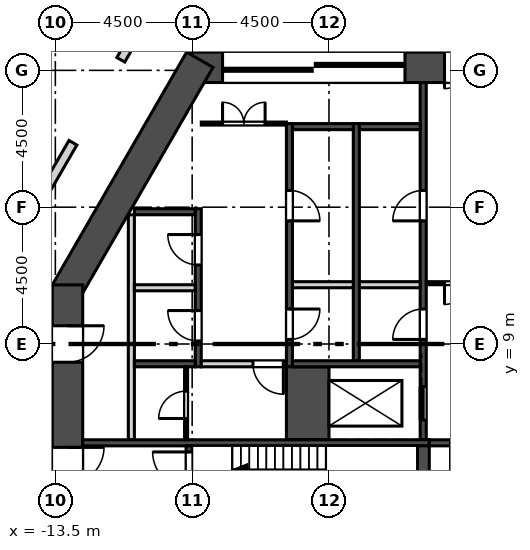
"""IFC4 building model, lengths in metres.
Left out: names, types, materials, properties, quantities, classifications, styles, units other than length and angle.
Written with IfcOpenShell. Run it as: python <this file> out.ifc"""

import sys

from ifc_helpers import new_model, si_unit, direction, frame, frame_2d, origin, place, context, subcontext, project, spatial, rectangle, extrude, element, fill, save


model = new_model("IFC4")
c1 = context("Model", 3, precision=1e-05, world=origin(), true_north=direction((0.0, 1.0)))
c2 = subcontext(c1, "Body", "Model", "MODEL_VIEW")
j1 = project(units=[si_unit("LENGTHUNIT", "METRE"), si_unit("PLANEANGLEUNIT", "RADIAN")], contexts=[c1])
p1 = place(None, origin())
s1 = spatial("IfcSite", under=j1, at=p1, CompositionType="ELEMENT")
p2 = place(p1, origin())
s2 = spatial("IfcBuilding", under=s1, at=p2, CompositionType="ELEMENT")
p3 = place(p2, frame((0.0, 0.0, 259.5)))
s3 = spatial("IfcBuildingStorey", under=s2, at=p3, CompositionType="ELEMENT", Elevation=259.5)
p4 = place(p3, frame((9.181, 18.1, 0.0), z_axis=(0.0, 0.0, 1.0), x_axis=(-1.0, 0.0, 0.0)))
e1 = element("IfcWall", 1, at=p4, inside=s3, PredefinedType="SHEAR", context=c2, shape_type="SweptSolid", body=[
    extrude(rectangle(XDim=18.361, YDim=1.0, at=frame_2d((9.181, 0.0))), origin(), (0.0, 0.0, 1.0), 7.2),
])
p5 = place(p4, frame((8.481, 0.0, 0.0)))
e2 = element("IfcOpeningElement", 2, at=p5, cuts=e1, PredefinedType="OPENING", context=c2, shape_type="SweptSolid", body=[
    extrude(rectangle(XDim=1.4, YDim=2.1, at=frame_2d((0.7, 1.05))), frame((0.0, 0.51, 0.0), z_axis=(0.0, -1.0, 0.0), x_axis=(1.0, 0.0, 0.0)), (0.0, 0.0, 1.0), 1.02),
])
p6 = place(p4, frame((11.181, 0.0, 0.0)))
e3 = element("IfcOpeningElement", 3, at=p6, cuts=e1, PredefinedType="OPENING", context=c2, shape_type="SweptSolid", body=[
    extrude(rectangle(XDim=6.0, YDim=2.4, at=frame_2d((3.0, 1.2))), frame((0.0, 0.51, 0.0), z_axis=(0.0, -1.0, 0.0), x_axis=(1.0, 0.0, 0.0)), (0.0, 0.0, 1.0), 1.02),
])
p7 = place(p4, frame((1.181, 0.0, 0.0)))
e4 = element("IfcOpeningElement", 4, at=p7, cuts=e1, PredefinedType="OPENING", context=c2, shape_type="SweptSolid", body=[
    extrude(rectangle(XDim=6.0, YDim=2.4, at=frame_2d((3.0, 1.2))), frame((0.0, 0.51, 0.0), z_axis=(0.0, -1.0, 0.0), x_axis=(1.0, 0.0, 0.0)), (0.0, 0.0, 1.0), 1.02),
])
p8 = place(p3, frame((-8.748, 18.35, 0.0), z_axis=(0.0, 0.0, 1.0), x_axis=(-0.499995021168, -0.866028278295, 0.0)))
e5 = element("IfcWall", 5, at=p8, inside=s3, PredefinedType="SHEAR", context=c2, shape_type="SweptSolid", body=[
    extrude(rectangle(XDim=8.839, YDim=1.0, at=frame_2d((4.419, 0.0))), origin(), (0.0, 0.0, 1.0), 7.2),
])
p9 = place(p3, frame((-13.1, 10.945, 0.0), z_axis=(0.0, 0.0, 1.0), x_axis=(0.0, -1.0, 0.0)))
e6 = element("IfcWall", 6, at=p9, inside=s3, PredefinedType="SHEAR", context=c2, shape_type="SweptSolid", body=[
    extrude(rectangle(XDim=9.695, YDim=1.0, at=frame_2d((4.848, 0.0))), origin(), (0.0, 0.0, 1.0), 7.2),
])
p10 = place(p9, frame((5.345, 0.0, 0.0)))
e7 = element("IfcOpeningElement", 7, at=p10, cuts=e6, PredefinedType="OPENING", context=c2, shape_type="SweptSolid", body=[
    extrude(rectangle(XDim=1.2, YDim=2.1, at=frame_2d((0.6, 1.05))), frame((0.0, 0.51, 0.0), z_axis=(0.0, -1.0, 0.0), x_axis=(1.0, 0.0, 0.0)), (0.0, 0.0, 1.0), 1.02),
])
p11 = place(p9, frame((1.345, 0.0, 0.0)))
e8 = element("IfcOpeningElement", 8, at=p11, cuts=e6, PredefinedType="OPENING", context=c2, shape_type="SweptSolid", body=[
    extrude(rectangle(XDim=1.2, YDim=2.1, at=frame_2d((0.6, 1.05))), frame((0.0, 0.51, 0.0), z_axis=(0.0, -1.0, 0.0), x_axis=(1.0, 0.0, 0.0)), (0.0, 0.0, 1.0), 1.02),
])
p12 = place(p3, frame((-4.353, 45.242, 0.0), z_axis=(0.0, 0.0, 1.0), x_axis=(-0.500000891752, -0.866024888931, 0.0)))
e9 = element("IfcWall", 9, at=p12, inside=s3, PredefinedType="SOLIDWALL", context=c2, shape_type="SweptSolid", body=[
    extrude(rectangle(XDim=43.339, YDim=0.34, at=frame_2d((21.669, 0.0))), origin(), (0.0, 0.0, 1.0), 6.8),
])
p13 = place(p3, frame((-11.0, 5.85, 0.0), z_axis=(0.0, 0.0, 1.0), x_axis=(0.0, 1.0, 0.0)))
e10 = element("IfcWall", 10, at=p13, inside=s3, PredefinedType="SOLIDWALL", context=c2, shape_type="SweptSolid", body=[
    extrude(rectangle(XDim=7.4, YDim=0.2, at=frame_2d((3.7, 0.0))), origin(), (0.0, 0.0, 1.0), 6.8),
])
p14 = place(p3, frame((-8.8, 8.25, -0.4), z_axis=(0.0, 0.0, 1.0), x_axis=(0.0, 1.0, 0.0)))
e11 = element("IfcWall", 11, at=p14, inside=s3, PredefinedType="SOLIDWALL", context=c2, shape_type="SweptSolid", body=[
    extrude(rectangle(XDim=5.2, YDim=0.2, at=frame_2d((2.6, 0.0))), origin(), (0.0, 0.0, 1.0), 7.2),
])
p15 = place(p14, frame((0.85, 0.0, 0.4)))
e12 = element("IfcOpeningElement", 12, at=p15, cuts=e11, PredefinedType="OPENING", context=c2, shape_type="SweptSolid", body=[
    extrude(rectangle(XDim=1.0, YDim=2.1, at=frame_2d((0.5, 1.05))), frame((0.0, 0.11, 0.0), z_axis=(0.0, -1.0, 0.0), x_axis=(1.0, 0.0, 0.0)), (0.0, 0.0, 1.0), 0.22),
])
p16 = place(p14, frame((3.35, 0.0, 0.4)))
e13 = element("IfcOpeningElement", 13, at=p16, cuts=e11, PredefinedType="OPENING", context=c2, shape_type="SweptSolid", body=[
    extrude(rectangle(XDim=1.0, YDim=2.1, at=frame_2d((0.5, 1.05))), frame((0.0, 0.11, 0.0), z_axis=(0.0, -1.0, 0.0), x_axis=(1.0, 0.0, 0.0)), (0.0, 0.0, 1.0), 0.22),
])
p17 = place(p3, frame((-5.8, 8.25, -0.4), z_axis=(0.0, 0.0, 1.0), x_axis=(0.0, 1.0, 0.0)))
e14 = element("IfcWall", 14, at=p17, inside=s3, PredefinedType="SOLIDWALL", context=c2, shape_type="SweptSolid", body=[
    extrude(rectangle(XDim=8.0, YDim=0.2, at=frame_2d((4.0, 0.0))), origin(), (0.0, 0.0, 1.0), 7.2),
])
p18 = place(p17, frame((0.9, 0.0, 0.4)))
e15 = element("IfcOpeningElement", 15, at=p18, cuts=e14, PredefinedType="OPENING", context=c2, shape_type="SweptSolid", body=[
    extrude(rectangle(XDim=1.0, YDim=2.1, at=frame_2d((0.5, 1.05))), frame((0.0, 0.11, 0.0), z_axis=(0.0, -1.0, 0.0), x_axis=(1.0, 0.0, 0.0)), (0.0, 0.0, 1.0), 0.22),
])
p19 = place(p17, frame((4.8, 0.0, 0.4)))
e16 = element("IfcOpeningElement", 16, at=p19, cuts=e14, PredefinedType="OPENING", context=c2, shape_type="SweptSolid", body=[
    extrude(rectangle(XDim=1.0, YDim=2.1, at=frame_2d((0.5, 1.05))), frame((0.0, 0.11, 0.0), z_axis=(0.0, -1.0, 0.0), x_axis=(1.0, 0.0, 0.0)), (0.0, 0.0, 1.0), 0.22),
])
p20 = place(p3, frame((-3.6, 8.45, -0.4), z_axis=(0.0, 0.0, 1.0), x_axis=(0.0, 1.0, 0.0)))
e17 = element("IfcWall", 17, at=p20, inside=s3, PredefinedType="SOLIDWALL", context=c2, shape_type="SweptSolid", body=[
    extrude(rectangle(XDim=7.8, YDim=0.2, at=frame_2d((3.9, 0.0))), origin(), (0.0, 0.0, 1.0), 7.2),
])
p21 = place(p3, frame((-1.4, 5.85, -0.4), z_axis=(0.0, 0.0, 1.0), x_axis=(0.0, 1.0, 0.0)))
e18 = element("IfcWall", 18, at=p21, inside=s3, PredefinedType="SOLIDWALL", context=c2, shape_type="SweptSolid", body=[
    extrude(rectangle(XDim=11.75, YDim=0.2, at=frame_2d((5.875, 0.0))), origin(), (0.0, 0.0, 1.0), 7.2),
])
p22 = place(p21, frame((0.65, 0.0, 0.4)))
e19 = element("IfcOpeningElement", 19, at=p22, cuts=e18, PredefinedType="OPENING", context=c2, shape_type="SweptSolid", body=[
    extrude(rectangle(XDim=1.1, YDim=2.1, at=frame_2d((0.55, 1.05))), frame((0.0, 0.11, 0.0), z_axis=(0.0, -1.0, 0.0), x_axis=(1.0, 0.0, 0.0)), (0.0, 0.0, 1.0), 0.22),
])
p23 = place(p21, frame((3.3, 0.0, 0.4)))
e20 = element("IfcOpeningElement", 20, at=p23, cuts=e18, PredefinedType="OPENING", context=c2, shape_type="SweptSolid", body=[
    extrude(rectangle(XDim=1.0, YDim=2.1, at=frame_2d((0.5, 1.05))), frame((0.0, 0.11, 0.0), z_axis=(0.0, -1.0, 0.0), x_axis=(1.0, 0.0, 0.0)), (0.0, 0.0, 1.0), 0.22),
])
p24 = place(p21, frame((7.2, 0.0, 0.4)))
e21 = element("IfcOpeningElement", 21, at=p24, cuts=e18, PredefinedType="OPENING", context=c2, shape_type="SweptSolid", body=[
    extrude(rectangle(XDim=1.0, YDim=2.1, at=frame_2d((0.5, 1.05))), frame((0.0, 0.11, 0.0), z_axis=(0.0, -1.0, 0.0), x_axis=(1.0, 0.0, 0.0)), (0.0, 0.0, 1.0), 0.22),
])
p25 = place(p3, frame((-5.2, 5.85, -0.4), z_axis=(0.0, 0.0, 1.0), x_axis=(0.0, 1.0, 0.0)))
e22 = element("IfcWall", 22, at=p25, inside=s3, PredefinedType="SOLIDWALL", context=c2, shape_type="SweptSolid", body=[
    extrude(rectangle(XDim=2.4, YDim=1.4, at=frame_2d((1.2, 0.0))), origin(), (0.0, 0.0, 1.0), 7.2),
])
p26 = place(p3, frame((-10.9, 8.35, -0.4), z_axis=(0.0, 0.0, 1.0), x_axis=(1.0, 0.0, 0.0)))
e23 = element("IfcWall", 23, at=p26, inside=s3, PredefinedType="SOLIDWALL", context=c2, shape_type="SweptSolid", body=[
    extrude(rectangle(XDim=2.0, YDim=0.2, at=frame_2d((1.0, 0.0))), origin(), (0.0, 0.0, 1.0), 7.2),
])
p27 = place(p3, frame((-5.7, 8.35, -0.4), z_axis=(0.0, 0.0, 1.0), x_axis=(1.0, 0.0, 0.0)))
e24 = element("IfcWall", 24, at=p27, inside=s3, PredefinedType="SOLIDWALL", context=c2, shape_type="SweptSolid", body=[
    extrude(rectangle(XDim=4.2, YDim=0.2, at=frame_2d((2.1, 0.0))), origin(), (0.0, 0.0, 1.0), 7.2),
])
p28 = place(p3, frame((-12.6, 5.75, -0.4), z_axis=(0.0, 0.0, 1.0), x_axis=(1.0, 0.0, 0.0)))
e25 = element("IfcWall", 25, at=p28, inside=s3, PredefinedType="SOLIDWALL", context=c2, shape_type="SweptSolid", body=[
    extrude(rectangle(XDim=11.4, YDim=0.2, at=frame_2d((5.7, 0.0))), origin(), (0.0, 0.0, 1.0), 7.2),
])
p29 = place(p3, frame((-1.2, 5.75, -0.4), z_axis=(0.0, 0.0, 1.0), x_axis=(1.0, 0.0, 0.0)))
e26 = element("IfcWall", 26, at=p29, inside=s3, PredefinedType="SOLIDWALL", context=c2, shape_type="SweptSolid", body=[
    extrude(rectangle(XDim=2.4, YDim=0.2, at=frame_2d((1.2, 0.0))), origin(), (0.0, 0.0, 1.0), 7.2),
])
p30 = place(p29, frame((0.7, 0.0, 0.4)))
e27 = element("IfcOpeningElement", 27, at=p30, cuts=e26, PredefinedType="OPENING", context=c2, shape_type="SweptSolid", body=[
    extrude(rectangle(XDim=1.0, YDim=2.1, at=frame_2d((0.5, 1.05))), frame((0.0, 0.11, 0.0), z_axis=(0.0, -1.0, 0.0), x_axis=(1.0, 0.0, 0.0)), (0.0, 0.0, 1.0), 0.22),
])
p31 = place(p3, frame((-9.1, 2.25, -0.4), z_axis=(0.0, 0.0, 1.0), x_axis=(0.0, 1.0, 0.0)))
e28 = element("IfcWall", 28, at=p31, inside=s3, PredefinedType="SOLIDWALL", context=c2, shape_type="SweptSolid", body=[
    extrude(rectangle(XDim=3.4, YDim=0.2, at=frame_2d((1.7, 0.0))), origin(), (0.0, 0.0, 1.0), 7.2),
])
p32 = place(p31, frame((0.2, 0.0, 0.4)))
e29 = element("IfcOpeningElement", 29, at=p32, cuts=e28, PredefinedType="OPENING", context=c2, shape_type="SweptSolid", body=[
    extrude(rectangle(XDim=1.2, YDim=2.1, at=frame_2d((0.6, 1.05))), frame((0.0, 0.11, 0.0), z_axis=(0.0, -1.0, 0.0), x_axis=(1.0, 0.0, 0.0)), (0.0, 0.0, 1.0), 0.22),
])
p33 = place(p31, frame((2.0, 0.0, 0.4)))
e30 = element("IfcOpeningElement", 30, at=p33, cuts=e28, PredefinedType="OPENING", context=c2, shape_type="SweptSolid", body=[
    extrude(rectangle(XDim=1.2, YDim=2.1, at=frame_2d((0.6, 1.05))), frame((0.0, 0.11, 0.0), z_axis=(0.0, -1.0, 0.0), x_axis=(1.0, 0.0, 0.0)), (0.0, 0.0, 1.0), 0.22),
])
p34 = place(p3, frame((-1.4, 2.25, -0.4), z_axis=(0.0, 0.0, 1.0), x_axis=(0.0, 1.0, 0.0)))
e31 = element("IfcWall", 31, at=p34, inside=s3, PredefinedType="SOLIDWALL", context=c2, shape_type="SweptSolid", body=[
    extrude(rectangle(XDim=3.4, YDim=0.4, at=frame_2d((1.7, 0.0))), origin(), (0.0, 0.0, 1.0), 7.2),
])
p35 = place(p3, frame((-10.9, 10.85, 0.0), z_axis=(0.0, 0.0, 1.0), x_axis=(1.0, 0.0, 0.0)))
e32 = element("IfcWall", 32, at=p35, inside=s3, PredefinedType="SOLIDWALL", context=c2, shape_type="SweptSolid", body=[
    extrude(rectangle(XDim=2.0, YDim=0.2, at=frame_2d((1.0, 0.0))), origin(), (0.0, 0.0, 1.0), 6.8),
])
p36 = place(p3, frame((-10.9, 13.35, -0.4), z_axis=(0.0, 0.0, 1.0), x_axis=(1.0, 0.0, 0.0)))
e33 = element("IfcWall", 33, at=p36, inside=s3, PredefinedType="SOLIDWALL", context=c2, shape_type="SweptSolid", body=[
    extrude(rectangle(XDim=2.0, YDim=0.2, at=frame_2d((1.0, 0.0))), origin(), (0.0, 0.0, 1.0), 7.2),
])
p37 = place(p3, frame((-5.7, 10.95, 0.0), z_axis=(0.0, 0.0, 1.0), x_axis=(1.0, 0.0, 0.0)))
e34 = element("IfcWall", 34, at=p37, inside=s3, PredefinedType="SOLIDWALL", context=c2, shape_type="SweptSolid", body=[
    extrude(rectangle(XDim=2.0, YDim=0.2, at=frame_2d((1.0, 0.0))), origin(), (0.0, 0.0, 1.0), 6.8),
])
p38 = place(p3, frame((-5.7, 16.15, -0.4), z_axis=(0.0, 0.0, 1.0), x_axis=(1.0, 0.0, 0.0)))
e35 = element("IfcWall", 35, at=p38, inside=s3, PredefinedType="SOLIDWALL", context=c2, shape_type="SweptSolid", body=[
    extrude(rectangle(XDim=2.0, YDim=0.2, at=frame_2d((1.0, 0.0))), origin(), (0.0, 0.0, 1.0), 7.2),
])
p39 = place(p3, frame((-3.5, 10.95, 0.0), z_axis=(0.0, 0.0, 1.0), x_axis=(1.0, 0.0, 0.0)))
e36 = element("IfcWall", 36, at=p39, inside=s3, PredefinedType="SOLIDWALL", context=c2, shape_type="SweptSolid", body=[
    extrude(rectangle(XDim=2.0, YDim=0.2, at=frame_2d((1.0, 0.0))), origin(), (0.0, 0.0, 1.0), 6.8),
])
p40 = place(p3, frame((-3.5, 16.15, -0.4), z_axis=(0.0, 0.0, 1.0), x_axis=(1.0, 0.0, 0.0)))
e37 = element("IfcWall", 37, at=p40, inside=s3, PredefinedType="SOLIDWALL", context=c2, shape_type="SweptSolid", body=[
    extrude(rectangle(XDim=2.0, YDim=0.2, at=frame_2d((1.0, 0.0))), origin(), (0.0, 0.0, 1.0), 7.2),
])
p41 = place(p3, frame((-8.7, 16.25, 0.0), z_axis=(0.0, 0.0, 1.0), x_axis=(1.0, 0.0, 0.0)))
e38 = element("IfcWall", 38, at=p41, inside=s3, PredefinedType="PARTITIONING", context=c2, shape_type="SweptSolid", body=[
    extrude(rectangle(XDim=2.8, YDim=0.1, at=frame_2d((1.4, 0.0))), origin(), (0.0, 0.0, 1.0), 6.8),
])
p42 = place(p41, frame((0.7, 0.0, 0.0)))
e39 = element("IfcOpeningElement", 39, at=p42, cuts=e38, PredefinedType="OPENING", context=c2, shape_type="SweptSolid", body=[
    extrude(rectangle(XDim=1.4, YDim=2.1, at=frame_2d((0.7, 1.05))), frame((0.0, 0.06, 0.0), z_axis=(0.0, -1.0, 0.0), x_axis=(1.0, 0.0, 0.0)), (0.0, 0.0, 1.0), 0.12),
])
p43 = place(p3, frame((-9.2, 5.85, 0.0), z_axis=(0.0, 0.0, 1.0), x_axis=(0.0, 1.0, 0.0)))
e40 = element("IfcWall", 40, at=p43, inside=s3, PredefinedType="PARTITIONING", context=c2, shape_type="SweptSolid", body=[
    extrude(rectangle(XDim=2.4, YDim=0.1, at=frame_2d((1.2, 0.0))), origin(), (0.0, 0.0, 1.0), 6.8),
])
p44 = place(p43, frame((0.7, 0.0, 0.0)))
e41 = element("IfcOpeningElement", 41, at=p44, cuts=e40, PredefinedType="OPENING", context=c2, shape_type="SweptSolid", body=[
    extrude(rectangle(XDim=0.9, YDim=2.1, at=frame_2d((0.45, 1.05))), frame((0.0, 0.06, 0.0), z_axis=(0.0, -1.0, 0.0), x_axis=(1.0, 0.0, 0.0)), (0.0, 0.0, 1.0), 0.12),
])
p45 = place(p3, frame((-8.7, 8.35, 0.0), z_axis=(0.0, 0.0, 1.0), x_axis=(1.0, 0.0, 0.0)))
e42 = element("IfcWall", 42, at=p45, inside=s3, PredefinedType="SOLIDWALL", context=c2, shape_type="SweptSolid", body=[
    extrude(rectangle(XDim=2.8, YDim=0.2, at=frame_2d((1.4, 0.0))), origin(), (0.0, 0.0, 1.0), 6.8),
])
p46 = place(p45, frame((1.7, 0.0, 0.0)))
e43 = element("IfcOpeningElement", 43, at=p46, cuts=e42, PredefinedType="OPENING", context=c2, shape_type="SweptSolid", body=[
    extrude(rectangle(XDim=1.0, YDim=2.1, at=frame_2d((0.5, 1.05))), frame((0.0, 0.11, 0.0), z_axis=(0.0, -1.0, 0.0), x_axis=(1.0, 0.0, 0.0)), (0.0, 0.0, 1.0), 0.22),
])
p47 = place(p3, frame((-1.3, 11.0, 0.0), z_axis=(0.0, 0.0, 1.0), x_axis=(1.0, 0.0, 0.0)))
e44 = element("IfcWall", 44, at=p47, inside=s3, PredefinedType="PARTITIONING", context=c2, shape_type="SweptSolid", body=[
    extrude(rectangle(XDim=2.6, YDim=0.1, at=frame_2d((1.3, 0.0))), origin(), (0.0, 0.0, 1.0), 6.8),
])
p48 = place(p47, frame((0.6, 0.0, 0.0)))
e45 = element("IfcOpeningElement", 45, at=p48, cuts=e44, PredefinedType="OPENING", context=c2, shape_type="SweptSolid", body=[
    extrude(rectangle(XDim=1.4, YDim=2.1, at=frame_2d((0.7, 1.05))), frame((0.0, 0.06, 0.0), z_axis=(0.0, -1.0, 0.0), x_axis=(1.0, 0.0, 0.0)), (0.0, 0.0, 1.0), 0.12),
])
p49 = place(p3, frame((-15.226, 11.629, 0.0), z_axis=(0.0, 0.0, 1.0), x_axis=(0.49997925212, 0.866037382247, 0.0)))
e46 = element("IfcWall", 46, at=p49, inside=s3, PredefinedType="SOLIDWALL", context=c2, shape_type="SweptSolid", body=[
    extrude(rectangle(XDim=4.609, YDim=0.3, at=frame_2d((2.304, 0.0))), origin(), (0.0, 0.0, 1.0), 6.8),
])
p50 = place(p3, frame((-11.347, 18.348, 0.0), z_axis=(0.0, 0.0, 1.0), x_axis=(0.500026652407, 0.866010015463, 0.0)))
e47 = element("IfcWall", 47, at=p50, inside=s3, PredefinedType="SOLIDWALL", context=c2, shape_type="SweptSolid", body=[
    extrude(rectangle(XDim=2.107, YDim=0.3, at=frame_2d((1.054, 0.0))), origin(), (0.0, 0.0, 1.0), 6.8),
])
p51 = place(p22, origin())
e48 = element("IfcDoor", 48, at=p51, inside=s3, OperationType="SLIDING_TO_RIGHT", PredefinedType="DOOR", context=c2, shape_type="SweptSolid", body=[
    extrude(rectangle(XDim=1.1, YDim=2.1, at=frame_2d((0.55, 1.05))), frame((0.0, 0.025, 0.0), z_axis=(0.0, -1.0, 0.0), x_axis=(1.0, 0.0, 0.0)), (0.0, 0.0, 1.0), 0.05),
])
fill(e19, e48)
p52 = place(p15, origin())
e49 = element("IfcDoor", 49, at=p52, inside=s3, OperationType="SINGLE_SWING_RIGHT", PredefinedType="DOOR", context=c2, shape_type="SweptSolid", body=[
    extrude(rectangle(XDim=1.0, YDim=2.1, at=frame_2d((0.5, 1.05))), frame((0.0, 0.025, 0.0), z_axis=(0.0, -1.0, 0.0), x_axis=(1.0, 0.0, 0.0)), (0.0, 0.0, 1.0), 0.05),
])
fill(e12, e49)
p53 = place(p16, origin())
e50 = element("IfcDoor", 50, at=p53, inside=s3, OperationType="SINGLE_SWING_RIGHT", PredefinedType="DOOR", context=c2, shape_type="SweptSolid", body=[
    extrude(rectangle(XDim=1.0, YDim=2.1, at=frame_2d((0.5, 1.05))), frame((0.0, 0.025, 0.0), z_axis=(0.0, -1.0, 0.0), x_axis=(1.0, 0.0, 0.0)), (0.0, 0.0, 1.0), 0.05),
])
fill(e13, e50)
p54 = place(p18, frame((1.0, 0.0, 0.0), z_axis=(0.0, 0.0, 1.0), x_axis=(-1.0, 0.0, 0.0)))
e51 = element("IfcDoor", 51, at=p54, inside=s3, OperationType="SINGLE_SWING_LEFT", PredefinedType="DOOR", context=c2, shape_type="SweptSolid", body=[
    extrude(rectangle(XDim=1.0, YDim=2.1, at=frame_2d((0.5, 1.05))), frame((0.0, 0.025, 0.0), z_axis=(0.0, -1.0, 0.0), x_axis=(1.0, 0.0, 0.0)), (0.0, 0.0, 1.0), 0.05),
])
fill(e15, e51)
p55 = place(p19, frame((1.0, 0.0, 0.0), z_axis=(0.0, 0.0, 1.0), x_axis=(-1.0, 0.0, 0.0)))
e52 = element("IfcDoor", 52, at=p55, inside=s3, OperationType="SINGLE_SWING_RIGHT", PredefinedType="DOOR", context=c2, shape_type="SweptSolid", body=[
    extrude(rectangle(XDim=1.0, YDim=2.1, at=frame_2d((0.5, 1.05))), frame((0.0, 0.025, 0.0), z_axis=(0.0, -1.0, 0.0), x_axis=(1.0, 0.0, 0.0)), (0.0, 0.0, 1.0), 0.05),
])
fill(e16, e52)
p56 = place(p23, origin())
e53 = element("IfcDoor", 53, at=p56, inside=s3, OperationType="SINGLE_SWING_LEFT", PredefinedType="DOOR", context=c2, shape_type="SweptSolid", body=[
    extrude(rectangle(XDim=1.0, YDim=2.1, at=frame_2d((0.5, 1.05))), frame((0.0, 0.025, 0.0), z_axis=(0.0, -1.0, 0.0), x_axis=(1.0, 0.0, 0.0)), (0.0, 0.0, 1.0), 0.05),
])
fill(e20, e53)
p57 = place(p24, origin())
e54 = element("IfcDoor", 54, at=p57, inside=s3, OperationType="SINGLE_SWING_LEFT", PredefinedType="DOOR", context=c2, shape_type="SweptSolid", body=[
    extrude(rectangle(XDim=1.0, YDim=2.1, at=frame_2d((0.5, 1.05))), frame((0.0, 0.025, 0.0), z_axis=(0.0, -1.0, 0.0), x_axis=(1.0, 0.0, 0.0)), (0.0, 0.0, 1.0), 0.05),
])
fill(e21, e54)
p58 = place(p42, origin())
e55 = element("IfcDoor", 55, at=p58, inside=s3, OperationType="DOUBLE_DOOR_SINGLE_SWING", PredefinedType="DOOR", context=c2, shape_type="SweptSolid", body=[
    extrude(rectangle(XDim=1.4, YDim=2.1, at=frame_2d((0.7, 1.05))), frame((0.0, 0.025, 0.0), z_axis=(0.0, -1.0, 0.0), x_axis=(1.0, 0.0, 0.0)), (0.0, 0.0, 1.0), 0.05),
])
fill(e39, e55)
p59 = place(p46, frame((1.0, 0.0, 0.0), z_axis=(0.0, 0.0, 1.0), x_axis=(-1.0, 0.0, 0.0)))
e56 = element("IfcDoor", 56, at=p59, inside=s3, OperationType="SINGLE_SWING_LEFT", PredefinedType="DOOR", context=c2, shape_type="SweptSolid", body=[
    extrude(rectangle(XDim=1.0, YDim=2.1, at=frame_2d((0.5, 1.05))), frame((0.0, 0.025, 0.0), z_axis=(0.0, -1.0, 0.0), x_axis=(1.0, 0.0, 0.0)), (0.0, 0.0, 1.0), 0.05),
])
fill(e43, e56)
p60 = place(p44, origin())
e57 = element("IfcDoor", 57, at=p60, inside=s3, OperationType="SINGLE_SWING_LEFT", PredefinedType="DOOR", context=c2, shape_type="SweptSolid", body=[
    extrude(rectangle(XDim=0.9, YDim=2.1, at=frame_2d((0.45, 1.05))), frame((0.0, 0.025, 0.0), z_axis=(0.0, -1.0, 0.0), x_axis=(1.0, 0.0, 0.0)), (0.0, 0.0, 1.0), 0.05),
])
fill(e41, e57)
p61 = place(p10, origin())
e58 = element("IfcDoor", 58, at=p61, inside=s3, OperationType="SINGLE_SWING_LEFT", PredefinedType="DOOR", context=c2, shape_type="SweptSolid", body=[
    extrude(rectangle(XDim=1.2, YDim=2.1, at=frame_2d((0.6, 1.05))), frame((0.0, 0.025, 0.0), z_axis=(0.0, -1.0, 0.0), x_axis=(1.0, 0.0, 0.0)), (0.0, 0.0, 1.0), 0.05),
])
fill(e7, e58)
p62 = place(p11, origin())
e59 = element("IfcDoor", 59, at=p62, inside=s3, OperationType="SINGLE_SWING_LEFT", PredefinedType="DOOR", context=c2, shape_type="SweptSolid", body=[
    extrude(rectangle(XDim=1.2, YDim=2.1, at=frame_2d((0.6, 1.05))), frame((0.0, 0.025, 0.0), z_axis=(0.0, -1.0, 0.0), x_axis=(1.0, 0.0, 0.0)), (0.0, 0.0, 1.0), 0.05),
])
fill(e8, e59)
p63 = place(p48, frame((1.4, 0.0, 0.0), z_axis=(0.0, 0.0, 1.0), x_axis=(-1.0, 0.0, 0.0)))
e60 = element("IfcDoor", 60, at=p63, inside=s3, OperationType="DOUBLE_DOOR_SINGLE_SWING", PredefinedType="DOOR", context=c2, shape_type="SweptSolid", body=[
    extrude(rectangle(XDim=1.4, YDim=2.1, at=frame_2d((0.7, 1.05))), frame((0.0, 0.025, 0.0), z_axis=(0.0, -1.0, 0.0), x_axis=(1.0, 0.0, 0.0)), (0.0, 0.0, 1.0), 0.05),
])
fill(e45, e60)
p64 = place(p5, origin())
e61 = element("IfcDoor", 61, at=p64, inside=s3, OperationType="DOUBLE_DOOR_SINGLE_SWING", PredefinedType="DOOR", context=c2, shape_type="SweptSolid", body=[
    extrude(rectangle(XDim=1.4, YDim=2.1, at=frame_2d((0.7, 1.05))), frame((0.0, 0.025, 0.0), z_axis=(0.0, -1.0, 0.0), x_axis=(1.0, 0.0, 0.0)), (0.0, 0.0, 1.0), 0.05),
])
fill(e2, e61)
p65 = place(p6, origin())
e62 = element("IfcDoor", 62, at=p65, inside=s3, OperationType="DOUBLE_DOOR_SLIDING", PredefinedType="DOOR", context=c2, shape_type="SweptSolid", body=[
    extrude(rectangle(XDim=6.0, YDim=2.4, at=frame_2d((3.0, 1.2))), frame((0.0, 0.025, 0.0), z_axis=(0.0, -1.0, 0.0), x_axis=(1.0, 0.0, 0.0)), (0.0, 0.0, 1.0), 0.05),
])
fill(e3, e62)
p66 = place(p33, origin())
e63 = element("IfcDoor", 63, at=p66, inside=s3, OperationType="SINGLE_SWING_RIGHT", PredefinedType="DOOR", context=c2, shape_type="SweptSolid", body=[
    extrude(rectangle(XDim=1.2, YDim=2.1, at=frame_2d((0.6, 1.05))), frame((0.0, 0.025, 0.0), z_axis=(0.0, -1.0, 0.0), x_axis=(1.0, 0.0, 0.0)), (0.0, 0.0, 1.0), 0.05),
])
fill(e30, e63)
save(model, sys.argv[1])
